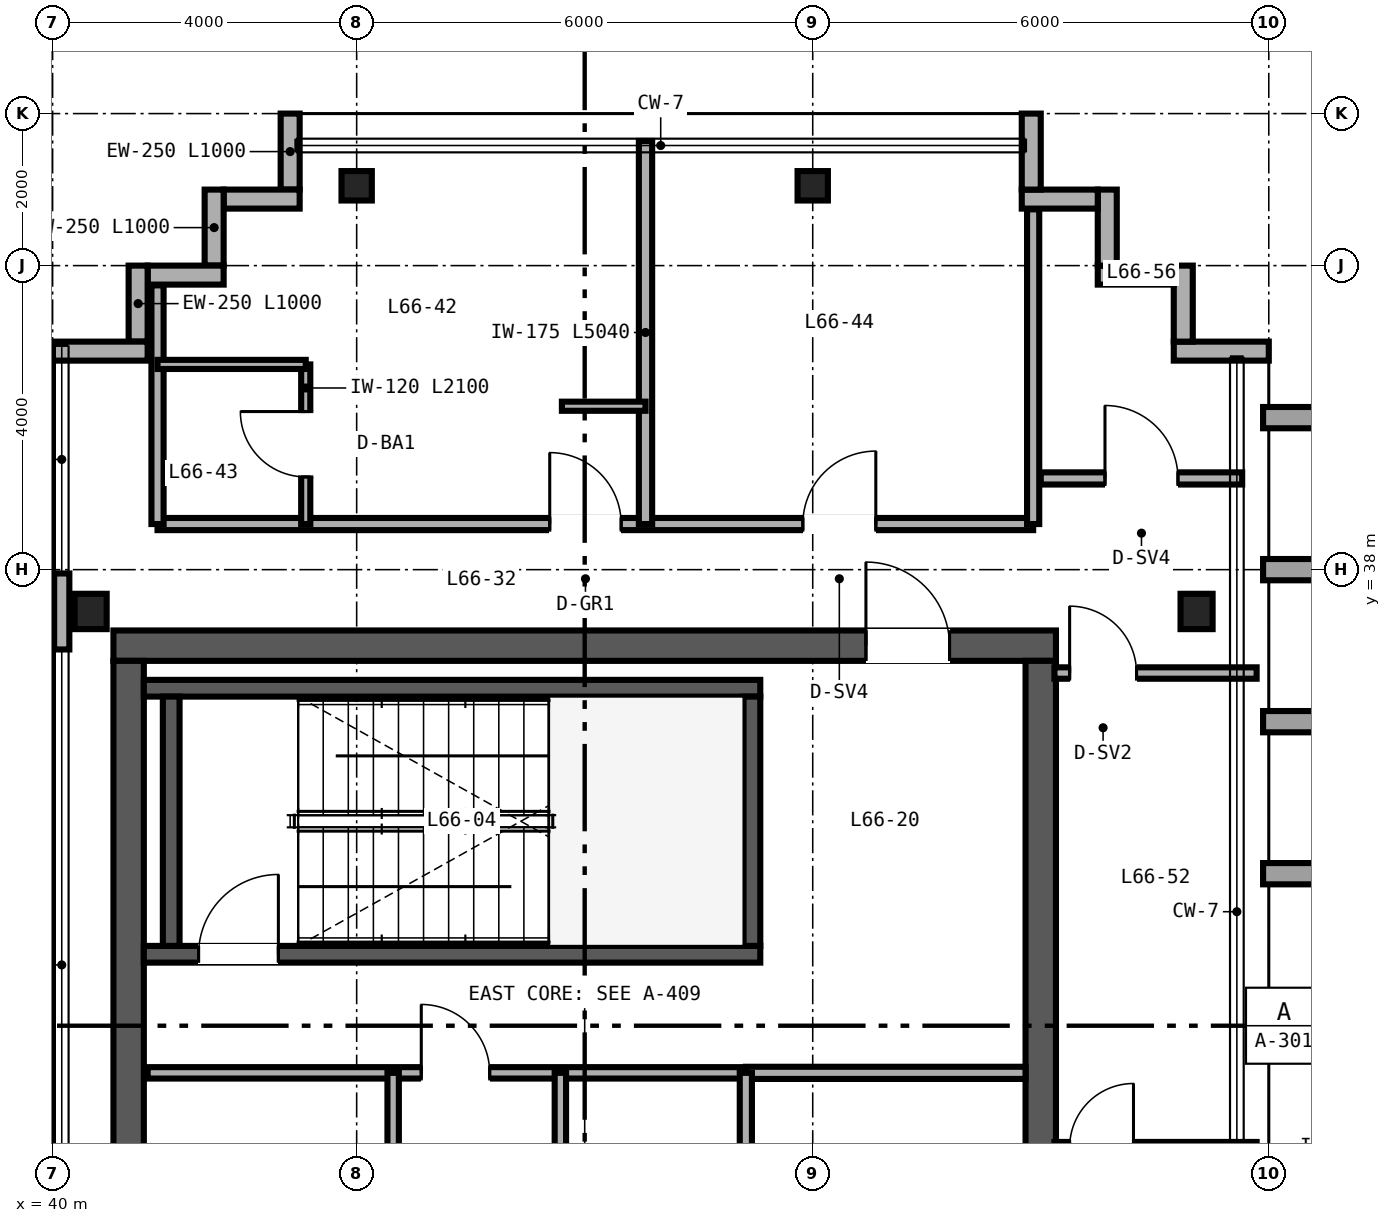
"""IFC4 building model, lengths in metres.
Left out: names, types, materials, properties, quantities, classifications, styles, units other than length and angle.
Written with IfcOpenShell. Run it as: python <this file> out.ifc"""

import sys

from ifc_helpers import new_model, si_unit, direction, frame, frame_2d, origin, origin_2d, place, context, subcontext, project, spatial, rectangle, i_section, extrude, source, transform, mapped, element, fill, save


model = new_model("IFC4")
c1 = context("Model", 3, precision=1e-05, world=origin(), true_north=direction((0.0, 1.0)))
c2 = subcontext(c1, "Body", "Model", "MODEL_VIEW")
j1 = project(units=[si_unit("LENGTHUNIT", "METRE"), si_unit("PLANEANGLEUNIT", "RADIAN")], contexts=[c1])
p1 = place(None, origin())
s1 = spatial("IfcSite", under=j1, at=p1, CompositionType="ELEMENT")
p2 = place(p1, origin())
s2 = spatial("IfcBuilding", under=s1, at=p2, CompositionType="ELEMENT")
p3 = place(p2, frame((0.0, 0.0, 261.6)))
s3 = spatial("IfcBuildingStorey", under=s2, at=p3, CompositionType="ELEMENT", Elevation=261.6)
p4 = place(p3, frame((40.8, 37.0, 0.0), z_axis=(0.0, 0.0, 1.0), x_axis=(1.0, 0.0, 0.0)))
e1 = element("IfcWall", 1, at=p4, inside=s3, PredefinedType="SHEAR", context=c2, shape_type="SweptSolid", body=[
    extrude(rectangle(XDim=12.4, YDim=0.4, at=frame_2d((6.2, 0.0))), origin(), (0.0, 0.0, 1.0), 3.38),
])
p5 = place(p4, frame((9.9, 0.0, 0.0)))
e2 = element("IfcOpeningElement", 2, at=p5, cuts=e1, PredefinedType="OPENING", context=c2, shape_type="SweptSolid", body=[
    extrude(rectangle(XDim=1.1, YDim=2.15, at=frame_2d((0.55, 1.075))), frame((0.0, 0.21, 0.0), z_axis=(0.0, -1.0, 0.0), x_axis=(1.0, 0.0, 0.0)), (0.0, 0.0, 1.0), 0.42),
])
for number, where, z_axis, x_axis in (
    (3, (41.0, 15.2, 0.0), (0.0, 0.0, 1.0), (0.0, 1.0, 0.0)),
    (4, (53.0, 15.2, 0.0), (0.0, 0.0, 1.0), (0.0, 1.0, 0.0)),
):
    element("IfcWall", number, at=place(p3, frame(where, z_axis=z_axis, x_axis=x_axis)), inside=s3, PredefinedType="SHEAR", context=c2, shape_type="SweptSolid", body=[
        extrude(rectangle(XDim=21.6, YDim=0.4, at=frame_2d((10.8, 0.0))), origin(), (0.0, 0.0, 1.0), 3.38),
    ])
p6 = place(p3, frame((41.2, 32.94, 0.0), z_axis=(0.0, 0.0, 1.0), x_axis=(1.0, 0.0, 0.0)))
e5 = element("IfcWall", 5, at=p6, inside=s3, PredefinedType="SHEAR", context=c2, shape_type="SweptSolid", body=[
    extrude(rectangle(XDim=8.11, YDim=0.22, at=frame_2d((4.055, 0.0))), origin(), (0.0, 0.0, 1.0), 3.4),
])
p7 = place(p6, frame((0.72, 0.0, 0.0)))
e6 = element("IfcOpeningElement", 6, at=p7, cuts=e5, PredefinedType="OPENING", context=c2, shape_type="SweptSolid", body=[
    extrude(rectangle(XDim=1.05, YDim=2.15, at=frame_2d((0.525, 1.075))), frame((0.0, 0.12, 0.0), z_axis=(0.0, -1.0, 0.0), x_axis=(1.0, 0.0, 0.0)), (0.0, 0.0, 1.0), 0.24),
])
p8 = place(p3, frame((41.2, 36.44, 0.0), z_axis=(0.0, 0.0, 1.0), x_axis=(1.0, 0.0, 0.0)))
e7 = element("IfcWall", 7, at=p8, inside=s3, PredefinedType="SHEAR", context=c2, shape_type="SweptSolid", body=[
    extrude(rectangle(XDim=8.11, YDim=0.22, at=frame_2d((4.055, 0.0))), origin(), (0.0, 0.0, 1.0), 3.4),
])
for number, where, z_axis, x_axis in (
    (8, (41.56, 33.05, 0.0), (0.0, 0.0, 1.0), (0.0, 1.0, 0.0)),
    (9, (49.2, 33.05, 0.0), (0.0, 0.0, 1.0), (0.0, 1.0, 0.0)),
):
    element("IfcWall", number, at=place(p3, frame(where, z_axis=z_axis, x_axis=x_axis)), inside=s3, PredefinedType="SHEAR", context=c2, shape_type="SweptSolid", body=[
        extrude(rectangle(XDim=3.28, YDim=0.22, at=frame_2d((1.64, 0.0))), origin(), (0.0, 0.0, 1.0), 3.4),
    ])
m1 = source(origin(), c2, "Body", "SweptSolid", [
    extrude(i_section(OverallWidth=0.422, OverallDepth=0.465, WebThickness=0.045, FlangeThickness=0.073, FilletRadius=0.025, at=origin_2d()), origin(), (0.0, 0.0, 1.0), 3.38),
])
for number, where, z_axis, x_axis in (
    (10, (40.5, 37.45, 0.0), (0.0, 0.0, 1.0), (1.0, 0.0, 0.0)),
    (11, (55.05, 37.45, 0.0), (0.0, 0.0, 1.0), (1.0, 0.0, 0.0)),
):
    element("IfcColumn", number, at=place(p3, frame(where, z_axis=z_axis, x_axis=x_axis)), inside=s3, PredefinedType="COLUMN", context=c2, shape_type="MappedRepresentation", body=[
        mapped(m1, transform((0.0, 0.0, 0.0), scale=1.0)),
    ])
m2 = source(origin(), c2, "Body", "SweptSolid", [
    extrude(i_section(OverallWidth=0.399, OverallDepth=0.387, WebThickness=0.021, FlangeThickness=0.033, FilletRadius=0.025, at=origin_2d()), origin(), (0.0, 0.0, 1.0), 3.38),
])
for number, where, z_axis, x_axis in (
    (12, (44.0, 43.05, 0.0), (0.0, 0.0, 1.0), (1.0, 0.0, 0.0)),
    (13, (50.0, 43.05, 0.0), (0.0, 0.0, 1.0), (1.0, 0.0, 0.0)),
):
    element("IfcColumn", number, at=place(p3, frame(where, z_axis=z_axis, x_axis=x_axis)), inside=s3, PredefinedType="COLUMN", context=c2, shape_type="MappedRepresentation", body=[
        mapped(m2, transform((0.0, 0.0, 0.0), scale=1.0)),
    ])
p9 = place(p3, frame((56.0, 40.875, 0.0), z_axis=(0.0, 0.0, 1.0), x_axis=(-1.0, 0.0, 0.0)))
e14 = element("IfcWall", 14, at=p9, inside=s3, PredefinedType="SOLIDWALL", context=c2, shape_type="SweptSolid", body=[
    extrude(rectangle(XDim=1.25, YDim=0.25, at=frame_2d((0.625, 0.0))), origin(), (0.0, 0.0, 1.0), 3.38),
])
for number, where, z_axis, x_axis in (
    (15, (54.875, 41.0, 0.0), (0.0, 0.0, 1.0), (0.0, 1.0, 0.0)),
    (16, (54.75, 41.875, 0.0), (0.0, 0.0, 1.0), (-1.0, 0.0, 0.0)),
    (17, (53.875, 42.0, 0.0), (0.0, 0.0, 1.0), (0.0, 1.0, 0.0)),
    (18, (53.75, 42.875, 0.0), (0.0, 0.0, 1.0), (-1.0, 0.0, 0.0)),
    (19, (52.875, 43.0, 0.0), (0.0, 0.0, 1.0), (0.0, 1.0, 0.0)),
    (20, (43.125, 44.0, 0.0), (0.0, 0.0, 1.0), (0.0, -1.0, 0.0)),
    (21, (43.25, 42.875, 0.0), (0.0, 0.0, 1.0), (-1.0, 0.0, 0.0)),
    (22, (42.125, 43.0, 0.0), (0.0, 0.0, 1.0), (0.0, -1.0, 0.0)),
    (23, (42.25, 41.875, 0.0), (0.0, 0.0, 1.0), (-1.0, 0.0, 0.0)),
    (24, (41.125, 42.0, 0.0), (0.0, 0.0, 1.0), (0.0, -1.0, 0.0)),
):
    element("IfcWall", number, at=place(p3, frame(where, z_axis=z_axis, x_axis=x_axis)), inside=s3, PredefinedType="SOLIDWALL", context=c2, shape_type="SweptSolid", body=[
        extrude(rectangle(XDim=1.0, YDim=0.25, at=frame_2d((0.5, 0.0))), origin(), (0.0, 0.0, 1.0), 3.38),
    ])
p10 = place(p3, frame((41.25, 40.875, 0.0), z_axis=(0.0, 0.0, 1.0), x_axis=(-1.0, 0.0, 0.0)))
e25 = element("IfcWall", 25, at=p10, inside=s3, PredefinedType="SOLIDWALL", context=c2, shape_type="SweptSolid", body=[
    extrude(rectangle(XDim=1.25, YDim=0.25, at=frame_2d((0.625, 0.0))), origin(), (0.0, 0.0, 1.0), 3.38),
])
p11 = place(p3, frame((40.12, 36.95, 0.0), z_axis=(0.0, 0.0, 1.0), x_axis=(0.0, 1.0, 0.0)))
e26 = element("IfcWall", 26, at=p11, inside=s3, PredefinedType="PARAPET", context=c2, shape_type="SweptSolid", body=[
    extrude(rectangle(XDim=1.0, YDim=0.2, at=frame_2d((0.5, 0.0))), origin(), (0.0, 0.0, 1.0), 3.38),
])
p12 = place(p3, frame((41.25, 31.38, 0.0), z_axis=(0.0, 0.0, 1.0), x_axis=(1.0, 0.0, 0.0)))
e27 = element("IfcWall", 27, at=p12, inside=s3, PredefinedType="PARTITIONING", context=c2, shape_type="SweptSolid", body=[
    extrude(rectangle(XDim=7.87, YDim=0.15, at=frame_2d((3.935, 0.0))), origin(), (0.0, 0.0, 1.0), 2.48),
])
p13 = place(p12, frame((3.6, 0.0, 0.0)))
e28 = element("IfcOpeningElement", 28, at=p13, cuts=e27, PredefinedType="OPENING", context=c2, shape_type="SweptSolid", body=[
    extrude(rectangle(XDim=0.9, YDim=2.15, at=frame_2d((0.45, 1.075))), frame((0.0, 0.085, 0.0), z_axis=(0.0, -1.0, 0.0), x_axis=(1.0, 0.0, 0.0)), (0.0, 0.0, 1.0), 0.17),
])
p14 = place(p3, frame((46.68, 15.25, 0.0), z_axis=(0.0, 0.0, 1.0), x_axis=(0.0, 1.0, 0.0)))
e29 = element("IfcWall", 29, at=p14, inside=s3, PredefinedType="PARTITIONING", context=c2, shape_type="SweptSolid", body=[
    extrude(rectangle(XDim=16.13, YDim=0.15, at=frame_2d((8.065, 0.0))), origin(), (0.0, 0.0, 1.0), 2.453),
])
p15 = place(p14, frame((3.2, 0.0, 0.0)))
e30 = element("IfcOpeningElement", 30, at=p15, cuts=e29, PredefinedType="OPENING", context=c2, shape_type="SweptSolid", body=[
    extrude(rectangle(XDim=0.88, YDim=2.15, at=frame_2d((0.44, 1.075))), frame((0.0, 0.085, 0.0), z_axis=(0.0, -1.0, 0.0), x_axis=(1.0, 0.0, 0.0)), (0.0, 0.0, 1.0), 0.17),
])
p16 = place(p14, frame((11.2, 0.0, 0.0)))
e31 = element("IfcOpeningElement", 31, at=p16, cuts=e29, PredefinedType="OPENING", context=c2, shape_type="SweptSolid", body=[
    extrude(rectangle(XDim=0.88, YDim=2.15, at=frame_2d((0.44, 1.075))), frame((0.0, 0.085, 0.0), z_axis=(0.0, -1.0, 0.0), x_axis=(1.0, 0.0, 0.0)), (0.0, 0.0, 1.0), 0.17),
])
p17 = place(p3, frame((49.12, 31.38, 0.0), z_axis=(0.0, 0.0, 1.0), x_axis=(1.0, 0.0, 0.0)))
e32 = element("IfcWall", 32, at=p17, inside=s3, PredefinedType="PARTITIONING", context=c2, shape_type="SweptSolid", body=[
    extrude(rectangle(XDim=3.68, YDim=0.16, at=frame_2d((1.84, 0.0))), origin(), (0.0, 0.0, 1.0), 2.48),
])
p18 = place(p3, frame((49.12, 15.25, 0.0), z_axis=(0.0, 0.0, 1.0), x_axis=(0.0, 1.0, 0.0)))
e33 = element("IfcWall", 33, at=p18, inside=s3, PredefinedType="PARTITIONING", context=c2, shape_type="SweptSolid", body=[
    extrude(rectangle(XDim=16.13, YDim=0.16, at=frame_2d((8.065, 0.0))), origin(), (0.0, 0.0, 1.0), 2.453),
])
p19 = place(p18, frame((2.2, 0.0, 0.0)))
e34 = element("IfcOpeningElement", 34, at=p19, cuts=e33, PredefinedType="OPENING", context=c2, shape_type="SweptSolid", body=[
    extrude(rectangle(XDim=0.9, YDim=2.15, at=frame_2d((0.45, 1.075))), frame((0.0, 0.09, 0.0), z_axis=(0.0, -1.0, 0.0), x_axis=(1.0, 0.0, 0.0)), (0.0, 0.0, 1.0), 0.18),
])
p20 = place(p18, frame((8.2, 0.0, 0.0)))
e35 = element("IfcOpeningElement", 35, at=p20, cuts=e33, PredefinedType="OPENING", context=c2, shape_type="SweptSolid", body=[
    extrude(rectangle(XDim=0.9, YDim=2.15, at=frame_2d((0.45, 1.075))), frame((0.0, 0.09, 0.0), z_axis=(0.0, -1.0, 0.0), x_axis=(1.0, 0.0, 0.0)), (0.0, 0.0, 1.0), 0.18),
])
p21 = place(p18, frame((13.5, 0.0, 0.0)))
e36 = element("IfcOpeningElement", 36, at=p21, cuts=e33, PredefinedType="OPENING", context=c2, shape_type="SweptSolid", body=[
    extrude(rectangle(XDim=0.9, YDim=2.15, at=frame_2d((0.45, 1.075))), frame((0.0, 0.09, 0.0), z_axis=(0.0, -1.0, 0.0), x_axis=(1.0, 0.0, 0.0)), (0.0, 0.0, 1.0), 0.18),
])
p22 = place(p3, frame((44.48, 15.25, 0.0), z_axis=(0.0, 0.0, 1.0), x_axis=(0.0, 1.0, 0.0)))
e37 = element("IfcWall", 37, at=p22, inside=s3, PredefinedType="PARTITIONING", context=c2, shape_type="SweptSolid", body=[
    extrude(rectangle(XDim=16.13, YDim=0.15, at=frame_2d((8.065, 0.0))), origin(), (0.0, 0.0, 1.0), 2.453),
])
p23 = place(p22, frame((2.2, 0.0, 0.0)))
e38 = element("IfcOpeningElement", 38, at=p23, cuts=e37, PredefinedType="OPENING", context=c2, shape_type="SweptSolid", body=[
    extrude(rectangle(XDim=0.9, YDim=2.15, at=frame_2d((0.45, 1.075))), frame((0.0, 0.085, 0.0), z_axis=(0.0, -1.0, 0.0), x_axis=(1.0, 0.0, 0.0)), (0.0, 0.0, 1.0), 0.17),
])
p24 = place(p22, frame((10.13, 0.0, 0.0)))
e39 = element("IfcOpeningElement", 39, at=p24, cuts=e37, PredefinedType="OPENING", context=c2, shape_type="SweptSolid", body=[
    extrude(rectangle(XDim=0.9, YDim=2.15, at=frame_2d((0.45, 1.075))), frame((0.0, 0.085, 0.0), z_axis=(0.0, -1.0, 0.0), x_axis=(1.0, 0.0, 0.0)), (0.0, 0.0, 1.0), 0.17),
])
p25 = place(p3, frame((41.38, 38.6, 0.0), z_axis=(0.0, 0.0, 1.0), x_axis=(1.0, 0.0, 0.0)))
e40 = element("IfcWall", 40, at=p25, inside=s3, PredefinedType="PARTITIONING", context=c2, shape_type="SweptSolid", body=[
    extrude(rectangle(XDim=11.52, YDim=0.16, at=frame_2d((5.76, 0.0))), origin(), (0.0, 0.0, 1.0), 3.38),
])
p26 = place(p25, frame((5.16, 0.0, 0.0)))
e41 = element("IfcOpeningElement", 41, at=p26, cuts=e40, PredefinedType="OPENING", context=c2, shape_type="SweptSolid", body=[
    extrude(rectangle(XDim=0.94, YDim=2.15, at=frame_2d((0.47, 1.075))), frame((0.0, 0.09, 0.0), z_axis=(0.0, -1.0, 0.0), x_axis=(1.0, 0.0, 0.0)), (0.0, 0.0, 1.0), 0.18),
])
p27 = place(p25, frame((8.49, 0.0, 0.0)))
e42 = element("IfcOpeningElement", 42, at=p27, cuts=e40, PredefinedType="OPENING", context=c2, shape_type="SweptSolid", body=[
    extrude(rectangle(XDim=0.96, YDim=2.15, at=frame_2d((0.48, 1.075))), frame((0.0, 0.09, 0.0), z_axis=(0.0, -1.0, 0.0), x_axis=(1.0, 0.0, 0.0)), (0.0, 0.0, 1.0), 0.18),
])
p28 = place(p3, frame((41.38, 38.6, 0.0), z_axis=(0.0, 0.0, 1.0), x_axis=(0.0, 1.0, 0.0)))
e43 = element("IfcWall", 43, at=p28, inside=s3, PredefinedType="PARTITIONING", context=c2, shape_type="SweptSolid", body=[
    extrude(rectangle(XDim=3.14, YDim=0.16, at=frame_2d((1.57, 0.0))), origin(), (0.0, 0.0, 1.0), 3.38),
])
p29 = place(p3, frame((52.9, 38.6, 0.0), z_axis=(0.0, 0.0, 1.0), x_axis=(0.0, 1.0, 0.0)))
e44 = element("IfcWall", 44, at=p29, inside=s3, PredefinedType="PARTITIONING", context=c2, shape_type="SweptSolid", body=[
    extrude(rectangle(XDim=4.14, YDim=0.16, at=frame_2d((2.07, 0.0))), origin(), (0.0, 0.0, 1.0), 3.38),
])
p30 = place(p3, frame((47.8, 38.6, 0.0), z_axis=(0.0, 0.0, 1.0), x_axis=(0.0, 1.0, 0.0)))
e45 = element("IfcWall", 45, at=p30, inside=s3, PredefinedType="PARTITIONING", context=c2, shape_type="SweptSolid", body=[
    extrude(rectangle(XDim=5.04, YDim=0.175, at=frame_2d((2.52, 0.0))), origin(), (0.0, 0.0, 1.0), 2.687),
])
p31 = place(p3, frame((43.33, 38.6, 0.0), z_axis=(0.0, 0.0, 1.0), x_axis=(0.0, 1.0, 0.0)))
e46 = element("IfcWall", 46, at=p31, inside=s3, PredefinedType="PARTITIONING", context=c2, shape_type="SweptSolid", body=[
    extrude(rectangle(XDim=2.1, YDim=0.12, at=frame_2d((1.05, 0.0))), origin(), (0.0, 0.0, 1.0), 3.38),
])
p32 = place(p31, frame((0.62, 0.0, 0.0)))
e47 = element("IfcOpeningElement", 47, at=p32, cuts=e46, PredefinedType="OPENING", context=c2, shape_type="SweptSolid", body=[
    extrude(rectangle(XDim=0.86, YDim=2.1, at=frame_2d((0.43, 1.05))), frame((0.0, 0.07, 0.0), z_axis=(0.0, -1.0, 0.0), x_axis=(1.0, 0.0, 0.0)), (0.0, 0.0, 1.0), 0.14),
])
p33 = place(p3, frame((41.38, 40.7, 0.0), z_axis=(0.0, 0.0, 1.0), x_axis=(1.0, 0.0, 0.0)))
e48 = element("IfcWall", 48, at=p33, inside=s3, PredefinedType="PARTITIONING", context=c2, shape_type="SweptSolid", body=[
    extrude(rectangle(XDim=1.95, YDim=0.12, at=frame_2d((0.975, 0.0))), origin(), (0.0, 0.0, 1.0), 3.38),
])
p34 = place(p3, frame((46.7, 40.15, 0.0), z_axis=(0.0, 0.0, 1.0), x_axis=(1.0, 0.0, 0.0)))
e49 = element("IfcWall", 49, at=p34, inside=s3, PredefinedType="PARTITIONING", context=c2, shape_type="SweptSolid", body=[
    extrude(rectangle(XDim=1.1, YDim=0.12, at=frame_2d((0.55, 0.0))), origin(), (0.0, 0.0, 1.0), 3.38),
])
p35 = place(p3, frame((53.18, 36.64, 0.0), z_axis=(0.0, 0.0, 1.0), x_axis=(1.0, 0.0, 0.0)))
e50 = element("IfcWall", 50, at=p35, inside=s3, PredefinedType="PARTITIONING", context=c2, shape_type="SweptSolid", body=[
    extrude(rectangle(XDim=2.66, YDim=0.15, at=frame_2d((1.33, 0.0))), origin(), (0.0, 0.0, 1.0), 2.763),
])
p36 = place(p35, frame((0.2, 0.0, 0.0)))
e51 = element("IfcOpeningElement", 51, at=p36, cuts=e50, PredefinedType="OPENING", context=c2, shape_type="SweptSolid", body=[
    extrude(rectangle(XDim=0.88, YDim=2.15, at=frame_2d((0.44, 1.075))), frame((0.0, 0.085, 0.0), z_axis=(0.0, -1.0, 0.0), x_axis=(1.0, 0.0, 0.0)), (0.0, 0.0, 1.0), 0.17),
])
p37 = place(p3, frame((53.18, 30.4, 0.0), z_axis=(0.0, 0.0, 1.0), x_axis=(1.0, 0.0, 0.0)))
e52 = element("IfcWall", 52, at=p37, inside=s3, PredefinedType="PARTITIONING", context=c2, shape_type="SweptSolid", body=[
    extrude(rectangle(XDim=2.66, YDim=0.142, at=frame_2d((1.33, 0.0))), origin(), (0.0, 0.0, 1.0), 2.763),
])
p38 = place(p37, frame((0.2, 0.0, 0.0)))
e53 = element("IfcOpeningElement", 53, at=p38, cuts=e52, PredefinedType="OPENING", context=c2, shape_type="SweptSolid", body=[
    extrude(rectangle(XDim=0.84, YDim=2.1, at=frame_2d((0.42, 1.05))), frame((0.0, 0.081, 0.0), z_axis=(0.0, -1.0, 0.0), x_axis=(1.0, 0.0, 0.0)), (0.0, 0.0, 1.0), 0.162),
])
p39 = place(p3, frame((53.0, 39.2, 0.0), z_axis=(0.0, 0.0, 1.0), x_axis=(1.0, 0.0, 0.0)))
e54 = element("IfcWall", 54, at=p39, inside=s3, PredefinedType="PARTITIONING", context=c2, shape_type="SweptSolid", body=[
    extrude(rectangle(XDim=2.65, YDim=0.16, at=frame_2d((1.325, 0.0))), origin(), (0.0, 0.0, 1.0), 3.38),
])
p40 = place(p39, frame((0.845, 0.0, 0.0)))
e55 = element("IfcOpeningElement", 55, at=p40, cuts=e54, PredefinedType="OPENING", context=c2, shape_type="SweptSolid", body=[
    extrude(rectangle(XDim=0.96, YDim=2.15, at=frame_2d((0.48, 1.075))), frame((0.0, 0.09, 0.0), z_axis=(0.0, -1.0, 0.0), x_axis=(1.0, 0.0, 0.0)), (0.0, 0.0, 1.0), 0.18),
])
m3 = source(origin(), c2, "Body", "SweptSolid", [
    extrude(rectangle(XDim=1.05, YDim=2.15, at=frame_2d((0.525, 1.075))), frame((0.0, 0.025, 0.0), z_axis=(0.0, -1.0, 0.0), x_axis=(1.0, 0.0, 0.0)), (0.0, 0.0, 1.0), 0.05),
])
p41 = place(p7, origin())
e56 = element("IfcDoor", 56, at=p41, inside=s3, OperationType="SINGLE_SWING_RIGHT", PredefinedType="DOOR", context=c2, shape_type="MappedRepresentation", body=[
    mapped(m3, transform((0.0, 0.0, 0.0), scale=1.0)),
])
fill(e6, e56)
m4 = source(origin(), c2, "Body", "SweptSolid", [
    extrude(rectangle(XDim=0.9, YDim=2.15, at=frame_2d((0.45, 1.075))), frame((0.0, 0.025, 0.0), z_axis=(0.0, -1.0, 0.0), x_axis=(1.0, 0.0, 0.0)), (0.0, 0.0, 1.0), 0.05),
])
p42 = place(p13, origin())
e57 = element("IfcDoor", 57, at=p42, inside=s3, OperationType="SINGLE_SWING_LEFT", PredefinedType="DOOR", context=c2, shape_type="MappedRepresentation", body=[
    mapped(m4, transform((0.0, 0.0, 0.0), scale=1.0)),
])
fill(e28, e57)
m5 = source(origin(), c2, "Body", "SweptSolid", [
    extrude(rectangle(XDim=1.1, YDim=2.15, at=frame_2d((0.55, 1.075))), frame((0.0, 0.025, 0.0), z_axis=(0.0, -1.0, 0.0), x_axis=(1.0, 0.0, 0.0)), (0.0, 0.0, 1.0), 0.05),
])
p43 = place(p5, origin())
e58 = element("IfcDoor", 58, at=p43, inside=s3, OperationType="SINGLE_SWING_LEFT", PredefinedType="DOOR", context=c2, shape_type="MappedRepresentation", body=[
    mapped(m5, transform((0.0, 0.0, 0.0), scale=1.0)),
])
fill(e2, e58)
m6 = source(origin(), c2, "Body", "SweptSolid", [
    extrude(rectangle(XDim=0.86, YDim=2.1, at=frame_2d((0.43, 1.05))), frame((0.0, 0.025, 0.0), z_axis=(0.0, -1.0, 0.0), x_axis=(1.0, 0.0, 0.0)), (0.0, 0.0, 1.0), 0.05),
])
p44 = place(p32, origin())
e59 = element("IfcDoor", 59, at=p44, inside=s3, OperationType="SINGLE_SWING_RIGHT", PredefinedType="DOOR", context=c2, shape_type="MappedRepresentation", body=[
    mapped(m6, transform((0.0, 0.0, 0.0), scale=1.0)),
])
fill(e47, e59)
m7 = source(origin(), c2, "Body", "SweptSolid", [
    extrude(rectangle(XDim=0.94, YDim=2.15, at=frame_2d((0.47, 1.075))), frame((0.0, 0.025, 0.0), z_axis=(0.0, -1.0, 0.0), x_axis=(1.0, 0.0, 0.0)), (0.0, 0.0, 1.0), 0.05),
])
p45 = place(p26, origin())
e60 = element("IfcDoor", 60, at=p45, inside=s3, OperationType="SINGLE_SWING_LEFT", PredefinedType="DOOR", context=c2, shape_type="MappedRepresentation", body=[
    mapped(m7, transform((0.0, 0.0, 0.0), scale=1.0)),
])
fill(e41, e60)
m8 = source(origin(), c2, "Body", "SweptSolid", [
    extrude(rectangle(XDim=0.96, YDim=2.15, at=frame_2d((0.48, 1.075))), frame((0.0, 0.025, 0.0), z_axis=(0.0, -1.0, 0.0), x_axis=(1.0, 0.0, 0.0)), (0.0, 0.0, 1.0), 0.05),
])
p46 = place(p27, origin())
e61 = element("IfcDoor", 61, at=p46, inside=s3, OperationType="SINGLE_SWING_RIGHT", PredefinedType="DOOR", context=c2, shape_type="MappedRepresentation", body=[
    mapped(m8, transform((0.0, 0.0, 0.0), scale=1.0)),
])
fill(e42, e61)
m9 = source(origin(), c2, "Body", "SweptSolid", [
    extrude(rectangle(XDim=0.88, YDim=2.15, at=frame_2d((0.44, 1.075))), frame((0.0, 0.025, 0.0), z_axis=(0.0, -1.0, 0.0), x_axis=(1.0, 0.0, 0.0)), (0.0, 0.0, 1.0), 0.05),
])
p47 = place(p36, origin())
e62 = element("IfcDoor", 62, at=p47, inside=s3, OperationType="SINGLE_SWING_LEFT", PredefinedType="DOOR", context=c2, shape_type="MappedRepresentation", body=[
    mapped(m9, transform((0.0, 0.0, 0.0), scale=1.0)),
])
fill(e51, e62)
p48 = place(p40, origin())
e63 = element("IfcDoor", 63, at=p48, inside=s3, OperationType="SINGLE_SWING_LEFT", PredefinedType="DOOR", context=c2, shape_type="MappedRepresentation", body=[
    mapped(m8, transform((0.0, 0.0, 0.0), scale=1.0)),
])
fill(e55, e63)
save(model, sys.argv[1])
